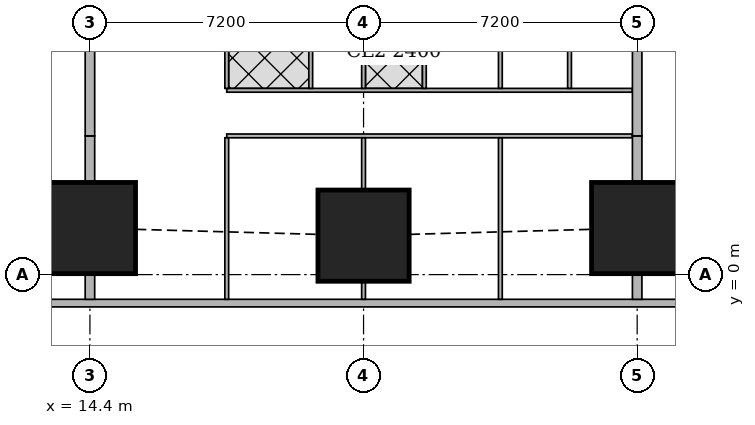
"""IFC4 building model, lengths in metres.
Left out: names, types, materials, properties, quantities, classifications, styles, units other than length and angle.
Written with IfcOpenShell. Run it as: python <this file> out.ifc"""

import sys

from ifc_helpers import new_model, si_unit, direction, frame, frame_2d, origin, origin_2d, place, context, subcontext, project, spatial, rectangle, extrude, element, fill, save


model = new_model("IFC4")
c1 = context("Model", 3, precision=1e-05, world=origin(), true_north=direction((0.0, 1.0)))
c2 = subcontext(c1, "Body", "Model", "MODEL_VIEW")
j1 = project(units=[si_unit("LENGTHUNIT", "METRE"), si_unit("PLANEANGLEUNIT", "RADIAN")], contexts=[c1])
p1 = place(None, origin())
s1 = spatial("IfcSite", under=j1, at=p1, CompositionType="ELEMENT")
p2 = place(p1, origin())
s2 = spatial("IfcBuilding", under=s1, at=p2, CompositionType="ELEMENT")
p3 = place(p2, frame((0.0, 0.0, 193.7)))
s3 = spatial("IfcBuildingStorey", under=s2, at=p3, CompositionType="ELEMENT", Elevation=193.7)
for number, where, z_axis, x_axis in (
    (1, (14.4, 1.225, 0.0), (0.0, 0.0, 1.0), (1.0, 0.0, 0.0)),
    (2, (21.6, 1.025, 0.0), (0.0, 0.0, 1.0), (1.0, 0.0, 0.0)),
    (3, (28.8, 1.225, 0.0), (0.0, 0.0, 1.0), (1.0, 0.0, 0.0)),
):
    element("IfcColumn", number, at=place(p3, frame(where, z_axis=z_axis, x_axis=x_axis)), inside=s3, PredefinedType="COLUMN", context=c2, shape_type="SweptSolid", body=[
        extrude(rectangle(XDim=2.4, YDim=2.4, at=origin_2d()), origin(), (0.0, 0.0, 1.0), 3.75),
    ])
p4 = place(p3, frame((7.363, -0.75, 0.0), z_axis=(0.0, 0.0, 1.0), x_axis=(1.0, 0.0, 0.0)))
e4 = element("IfcWall", 4, at=p4, inside=s3, PredefinedType="SOLIDWALL", context=c2, shape_type="SweptSolid", body=[
    extrude(rectangle(XDim=40.428, YDim=0.2, at=frame_2d((20.214, 0.0))), origin(), (0.0, 0.0, 1.0), 3.5),
])
p5 = place(p4, frame((2.319, 0.0, 0.9)))
e5 = element("IfcOpeningElement", 5, at=p5, cuts=e4, PredefinedType="OPENING", context=c2, shape_type="SweptSolid", body=[
    extrude(rectangle(XDim=2.4, YDim=1.5, at=frame_2d((1.2, 0.75))), frame((0.0, 0.11, 0.0), z_axis=(0.0, -1.0, 0.0), x_axis=(1.0, 0.0, 0.0)), (0.0, 0.0, 1.0), 0.22),
])
p6 = place(p4, frame((7.937, 0.0, 0.9)))
e6 = element("IfcOpeningElement", 6, at=p6, cuts=e4, PredefinedType="OPENING", context=c2, shape_type="SweptSolid", body=[
    extrude(rectangle(XDim=1.8, YDim=1.5, at=frame_2d((0.9, 0.75))), frame((0.0, 0.11, 0.0), z_axis=(0.0, -1.0, 0.0), x_axis=(1.0, 0.0, 0.0)), (0.0, 0.0, 1.0), 0.22),
])
p7 = place(p4, frame((11.537, 0.0, 0.9)))
e7 = element("IfcOpeningElement", 7, at=p7, cuts=e4, PredefinedType="OPENING", context=c2, shape_type="SweptSolid", body=[
    extrude(rectangle(XDim=1.8, YDim=1.5, at=frame_2d((0.9, 0.75))), frame((0.0, 0.11, 0.0), z_axis=(0.0, -1.0, 0.0), x_axis=(1.0, 0.0, 0.0)), (0.0, 0.0, 1.0), 0.22),
])
p8 = place(p4, frame((15.137, 0.0, 0.9)))
e8 = element("IfcOpeningElement", 8, at=p8, cuts=e4, PredefinedType="OPENING", context=c2, shape_type="SweptSolid", body=[
    extrude(rectangle(XDim=1.8, YDim=1.5, at=frame_2d((0.9, 0.75))), frame((0.0, 0.11, 0.0), z_axis=(0.0, -1.0, 0.0), x_axis=(1.0, 0.0, 0.0)), (0.0, 0.0, 1.0), 0.22),
])
p9 = place(p4, frame((18.737, 0.0, 0.9)))
e9 = element("IfcOpeningElement", 9, at=p9, cuts=e4, PredefinedType="OPENING", context=c2, shape_type="SweptSolid", body=[
    extrude(rectangle(XDim=1.8, YDim=1.5, at=frame_2d((0.9, 0.75))), frame((0.0, 0.11, 0.0), z_axis=(0.0, -1.0, 0.0), x_axis=(1.0, 0.0, 0.0)), (0.0, 0.0, 1.0), 0.22),
])
p10 = place(p4, frame((22.337, 0.0, 0.9)))
e10 = element("IfcOpeningElement", 10, at=p10, cuts=e4, PredefinedType="OPENING", context=c2, shape_type="SweptSolid", body=[
    extrude(rectangle(XDim=1.8, YDim=1.5, at=frame_2d((0.9, 0.75))), frame((0.0, 0.11, 0.0), z_axis=(0.0, -1.0, 0.0), x_axis=(1.0, 0.0, 0.0)), (0.0, 0.0, 1.0), 0.22),
])
p11 = place(p4, frame((25.937, 0.0, 0.9)))
e11 = element("IfcOpeningElement", 11, at=p11, cuts=e4, PredefinedType="OPENING", context=c2, shape_type="SweptSolid", body=[
    extrude(rectangle(XDim=1.8, YDim=1.5, at=frame_2d((0.9, 0.75))), frame((0.0, 0.11, 0.0), z_axis=(0.0, -1.0, 0.0), x_axis=(1.0, 0.0, 0.0)), (0.0, 0.0, 1.0), 0.22),
])
p12 = place(p4, frame((29.537, 0.0, 0.9)))
e12 = element("IfcOpeningElement", 12, at=p12, cuts=e4, PredefinedType="OPENING", context=c2, shape_type="SweptSolid", body=[
    extrude(rectangle(XDim=1.8, YDim=1.5, at=frame_2d((0.9, 0.75))), frame((0.0, 0.11, 0.0), z_axis=(0.0, -1.0, 0.0), x_axis=(1.0, 0.0, 0.0)), (0.0, 0.0, 1.0), 0.22),
])
p13 = place(p4, frame((33.137, 0.0, 0.9)))
e13 = element("IfcOpeningElement", 13, at=p13, cuts=e4, PredefinedType="OPENING", context=c2, shape_type="SweptSolid", body=[
    extrude(rectangle(XDim=1.8, YDim=1.5, at=frame_2d((0.9, 0.75))), frame((0.0, 0.11, 0.0), z_axis=(0.0, -1.0, 0.0), x_axis=(1.0, 0.0, 0.0)), (0.0, 0.0, 1.0), 0.22),
])
p14 = place(p3, frame((28.675, 3.65, 0.0), z_axis=(0.0, 0.0, 1.0), x_axis=(-1.0, 0.0, 0.0)))
e14 = element("IfcWall", 14, at=p14, inside=s3, PredefinedType="PARTITIONING", context=c2, shape_type="SweptSolid", body=[
    extrude(rectangle(XDim=10.675, YDim=0.1, at=frame_2d((5.337, 0.0))), origin(), (0.0, 0.0, 1.0), 3.5),
])
p15 = place(p14, frame((9.575, 0.0, 0.0)))
e15 = element("IfcOpeningElement", 15, at=p15, cuts=e14, PredefinedType="OPENING", context=c2, shape_type="SweptSolid", body=[
    extrude(rectangle(XDim=0.9, YDim=2.1, at=frame_2d((0.45, 1.05))), frame((0.0, 0.06, 0.0), z_axis=(0.0, -1.0, 0.0), x_axis=(1.0, 0.0, 0.0)), (0.0, 0.0, 1.0), 0.12),
])
p16 = place(p14, frame((5.975, 0.0, 0.0)))
e16 = element("IfcOpeningElement", 16, at=p16, cuts=e14, PredefinedType="OPENING", context=c2, shape_type="SweptSolid", body=[
    extrude(rectangle(XDim=0.9, YDim=2.1, at=frame_2d((0.45, 1.05))), frame((0.0, 0.06, 0.0), z_axis=(0.0, -1.0, 0.0), x_axis=(1.0, 0.0, 0.0)), (0.0, 0.0, 1.0), 0.12),
])
p17 = place(p14, frame((2.375, 0.0, 0.0)))
e17 = element("IfcOpeningElement", 17, at=p17, cuts=e14, PredefinedType="OPENING", context=c2, shape_type="SweptSolid", body=[
    extrude(rectangle(XDim=0.9, YDim=2.1, at=frame_2d((0.45, 1.05))), frame((0.0, 0.06, 0.0), z_axis=(0.0, -1.0, 0.0), x_axis=(1.0, 0.0, 0.0)), (0.0, 0.0, 1.0), 0.12),
])
p18 = place(p3, frame((28.675, 4.85, 0.0), z_axis=(0.0, 0.0, 1.0), x_axis=(-1.0, 0.0, 0.0)))
e18 = element("IfcWall", 18, at=p18, inside=s3, PredefinedType="PARTITIONING", context=c2, shape_type="SweptSolid", body=[
    extrude(rectangle(XDim=10.675, YDim=0.1, at=frame_2d((5.337, 0.0))), origin(), (0.0, 0.0, 1.0), 3.5),
])
p19 = place(p18, frame((9.12, 0.0, 0.0)))
e19 = element("IfcOpeningElement", 19, at=p19, cuts=e18, PredefinedType="OPENING", context=c2, shape_type="SweptSolid", body=[
    extrude(rectangle(XDim=0.9, YDim=2.1, at=frame_2d((0.45, 1.05))), frame((0.0, 0.06, 0.0), z_axis=(0.0, -1.0, 0.0), x_axis=(1.0, 0.0, 0.0)), (0.0, 0.0, 1.0), 0.12),
])
p20 = place(p18, frame((5.825, 0.0, 0.0)))
e20 = element("IfcOpeningElement", 20, at=p20, cuts=e18, PredefinedType="OPENING", context=c2, shape_type="SweptSolid", body=[
    extrude(rectangle(XDim=0.9, YDim=2.1, at=frame_2d((0.45, 1.05))), frame((0.0, 0.06, 0.0), z_axis=(0.0, -1.0, 0.0), x_axis=(1.0, 0.0, 0.0)), (0.0, 0.0, 1.0), 0.12),
])
p21 = place(p18, frame((2.115, 0.0, 0.0)))
e21 = element("IfcOpeningElement", 21, at=p21, cuts=e18, PredefinedType="OPENING", context=c2, shape_type="SweptSolid", body=[
    extrude(rectangle(XDim=0.9, YDim=2.1, at=frame_2d((0.45, 1.05))), frame((0.0, 0.06, 0.0), z_axis=(0.0, -1.0, 0.0), x_axis=(1.0, 0.0, 0.0)), (0.0, 0.0, 1.0), 0.12),
])
p22 = place(p18, frame((7.32, 0.0, 0.0)))
e22 = element("IfcOpeningElement", 22, at=p22, cuts=e18, PredefinedType="OPENING", context=c2, shape_type="SweptSolid", body=[
    extrude(rectangle(XDim=0.9, YDim=2.1, at=frame_2d((0.45, 1.05))), frame((0.0, 0.06, 0.0), z_axis=(0.0, -1.0, 0.0), x_axis=(1.0, 0.0, 0.0)), (0.0, 0.0, 1.0), 0.12),
])
p23 = place(p18, frame((4.025, 0.0, 0.0)))
e23 = element("IfcOpeningElement", 23, at=p23, cuts=e18, PredefinedType="OPENING", context=c2, shape_type="SweptSolid", body=[
    extrude(rectangle(XDim=0.9, YDim=2.1, at=frame_2d((0.45, 1.05))), frame((0.0, 0.06, 0.0), z_axis=(0.0, -1.0, 0.0), x_axis=(1.0, 0.0, 0.0)), (0.0, 0.0, 1.0), 0.12),
])
p24 = place(p18, frame((0.315, 0.0, 0.0)))
e24 = element("IfcOpeningElement", 24, at=p24, cuts=e18, PredefinedType="OPENING", context=c2, shape_type="SweptSolid", body=[
    extrude(rectangle(XDim=0.9, YDim=2.1, at=frame_2d((0.45, 1.05))), frame((0.0, 0.06, 0.0), z_axis=(0.0, -1.0, 0.0), x_axis=(1.0, 0.0, 0.0)), (0.0, 0.0, 1.0), 0.12),
])
p25 = place(p3, frame((18.0, -0.65, 0.0), z_axis=(0.0, 0.0, 1.0), x_axis=(0.0, 1.0, 0.0)))
e25 = element("IfcWall", 25, at=p25, inside=s3, PredefinedType="PARTITIONING", context=c2, shape_type="SweptSolid", body=[
    extrude(rectangle(XDim=4.25, YDim=0.1, at=frame_2d((2.125, 0.0))), origin(), (0.0, 0.0, 1.0), 2.05),
])
p26 = place(p3, frame((21.6, -0.65, 0.0), z_axis=(0.0, 0.0, 1.0), x_axis=(0.0, 1.0, 0.0)))
e26 = element("IfcWall", 26, at=p26, inside=s3, PredefinedType="PARTITIONING", context=c2, shape_type="SweptSolid", body=[
    extrude(rectangle(XDim=0.474, YDim=0.1, at=frame_2d((0.237, 0.0))), origin(), (0.0, 0.0, 1.0), 3.5),
])
p27 = place(p3, frame((21.6, 2.226, 0.0), z_axis=(0.0, 0.0, 1.0), x_axis=(0.0, 1.0, 0.0)))
e27 = element("IfcWall", 27, at=p27, inside=s3, PredefinedType="PARTITIONING", context=c2, shape_type="SweptSolid", body=[
    extrude(rectangle(XDim=1.374, YDim=0.1, at=frame_2d((0.687, 0.0))), origin(), (0.0, 0.0, 1.0), 3.5),
])
p28 = place(p3, frame((25.2, -0.65, 0.0), z_axis=(0.0, 0.0, 1.0), x_axis=(0.0, 1.0, 0.0)))
e28 = element("IfcWall", 28, at=p28, inside=s3, PredefinedType="PARTITIONING", context=c2, shape_type="SweptSolid", body=[
    extrude(rectangle(XDim=4.25, YDim=0.1, at=frame_2d((2.125, 0.0))), origin(), (0.0, 0.0, 1.0), 2.05),
])
p29 = place(p3, frame((18.0, 4.9, 0.0), z_axis=(0.0, 0.0, 1.0), x_axis=(0.0, 1.0, 0.0)))
e29 = element("IfcWall", 29, at=p29, inside=s3, PredefinedType="PARTITIONING", context=c2, shape_type="SweptSolid", body=[
    extrude(rectangle(XDim=3.275, YDim=0.1, at=frame_2d((1.638, 0.0))), origin(), (0.0, 0.0, 1.0), 3.5),
])
p30 = place(p3, frame((21.6, 4.9, 0.0), z_axis=(0.0, 0.0, 1.0), x_axis=(0.0, 1.0, 0.0)))
e30 = element("IfcWall", 30, at=p30, inside=s3, PredefinedType="PARTITIONING", context=c2, shape_type="SweptSolid", body=[
    extrude(rectangle(XDim=1.899, YDim=0.1, at=frame_2d((0.95, 0.0))), origin(), (0.0, 0.0, 1.0), 3.5),
])
for number, where, z_axis, x_axis in (
    (31, (25.2, 4.9, 0.0), (0.0, 0.0, 1.0), (0.0, 1.0, 0.0)),
    (32, (20.21, 4.9, 0.0), (0.0, 0.0, 1.0), (0.0, 1.0, 0.0)),
    (33, (23.2, 4.9, 0.0), (0.0, 0.0, 1.0), (0.0, 1.0, 0.0)),
    (34, (27.02, 4.9, 0.0), (0.0, 0.0, 1.0), (0.0, 1.0, 0.0)),
):
    element("IfcWall", number, at=place(p3, frame(where, z_axis=z_axis, x_axis=x_axis)), inside=s3, PredefinedType="PARTITIONING", context=c2, shape_type="SweptSolid", body=[
        extrude(rectangle(XDim=3.275, YDim=0.1, at=frame_2d((1.638, 0.0))), origin(), (0.0, 0.0, 1.0), 3.5),
    ])
p31 = place(p3, frame((14.4, -0.65, 0.0), z_axis=(0.0, 0.0, 1.0), x_axis=(0.0, 1.0, 0.0)))
e35 = element("IfcWall", 35, at=p31, inside=s3, PredefinedType="SOLIDWALL", context=c2, shape_type="SweptSolid", body=[
    extrude(rectangle(XDim=0.674, YDim=0.25, at=frame_2d((0.337, 0.0))), origin(), (0.0, 0.0, 1.0), 2.05),
])
p32 = place(p3, frame((14.4, 2.426, 0.0), z_axis=(0.0, 0.0, 1.0), x_axis=(0.0, 1.0, 0.0)))
e36 = element("IfcWall", 36, at=p32, inside=s3, PredefinedType="SOLIDWALL", context=c2, shape_type="SweptSolid", body=[
    extrude(rectangle(XDim=1.224, YDim=0.25, at=frame_2d((0.612, 0.0))), origin(), (0.0, 0.0, 1.0), 2.05),
])
p33 = place(p3, frame((14.4, 3.65, 0.0), z_axis=(0.0, 0.0, 1.0), x_axis=(0.0, 1.0, 0.0)))
e37 = element("IfcWall", 37, at=p33, inside=s3, PredefinedType="SOLIDWALL", context=c2, shape_type="SweptSolid", body=[
    extrude(rectangle(XDim=3.149, YDim=0.25, at=frame_2d((1.575, 0.0))), origin(), (0.0, 0.0, 1.0), 3.5),
])
p34 = place(p3, frame((28.8, -0.65, 0.0), z_axis=(0.0, 0.0, 1.0), x_axis=(0.0, 1.0, 0.0)))
e38 = element("IfcWall", 38, at=p34, inside=s3, PredefinedType="SOLIDWALL", context=c2, shape_type="SweptSolid", body=[
    extrude(rectangle(XDim=0.674, YDim=0.25, at=frame_2d((0.337, 0.0))), origin(), (0.0, 0.0, 1.0), 2.05),
])
p35 = place(p3, frame((28.8, 2.426, 0.0), z_axis=(0.0, 0.0, 1.0), x_axis=(0.0, 1.0, 0.0)))
e39 = element("IfcWall", 39, at=p35, inside=s3, PredefinedType="SOLIDWALL", context=c2, shape_type="SweptSolid", body=[
    extrude(rectangle(XDim=1.224, YDim=0.25, at=frame_2d((0.612, 0.0))), origin(), (0.0, 0.0, 1.0), 2.05),
])
p36 = place(p3, frame((28.8, 3.65, 0.0), z_axis=(0.0, 0.0, 1.0), x_axis=(0.0, 1.0, 0.0)))
e40 = element("IfcWall", 40, at=p36, inside=s3, PredefinedType="SOLIDWALL", context=c2, shape_type="SweptSolid", body=[
    extrude(rectangle(XDim=3.149, YDim=0.25, at=frame_2d((1.575, 0.0))), origin(), (0.0, 0.0, 1.0), 3.5),
])
p37 = place(p6, origin())
e41 = element("IfcWindow", 41, at=p37, inside=s3, PartitioningType="SINGLE_PANEL", PredefinedType="WINDOW", context=c2, shape_type="SweptSolid", body=[
    extrude(rectangle(XDim=1.8, YDim=1.5, at=frame_2d((0.9, 0.75))), frame((0.0, 0.03, 0.0), z_axis=(0.0, -1.0, 0.0), x_axis=(1.0, 0.0, 0.0)), (0.0, 0.0, 1.0), 0.06),
])
fill(e6, e41)
p38 = place(p7, origin())
e42 = element("IfcWindow", 42, at=p38, inside=s3, PartitioningType="SINGLE_PANEL", PredefinedType="WINDOW", context=c2, shape_type="SweptSolid", body=[
    extrude(rectangle(XDim=1.8, YDim=1.5, at=frame_2d((0.9, 0.75))), frame((0.0, 0.03, 0.0), z_axis=(0.0, -1.0, 0.0), x_axis=(1.0, 0.0, 0.0)), (0.0, 0.0, 1.0), 0.06),
])
fill(e7, e42)
p39 = place(p8, origin())
e43 = element("IfcWindow", 43, at=p39, inside=s3, PartitioningType="SINGLE_PANEL", PredefinedType="WINDOW", context=c2, shape_type="SweptSolid", body=[
    extrude(rectangle(XDim=1.8, YDim=1.5, at=frame_2d((0.9, 0.75))), frame((0.0, 0.03, 0.0), z_axis=(0.0, -1.0, 0.0), x_axis=(1.0, 0.0, 0.0)), (0.0, 0.0, 1.0), 0.06),
])
fill(e8, e43)
p40 = place(p9, origin())
e44 = element("IfcWindow", 44, at=p40, inside=s3, PartitioningType="SINGLE_PANEL", PredefinedType="WINDOW", context=c2, shape_type="SweptSolid", body=[
    extrude(rectangle(XDim=1.8, YDim=1.5, at=frame_2d((0.9, 0.75))), frame((0.0, 0.03, 0.0), z_axis=(0.0, -1.0, 0.0), x_axis=(1.0, 0.0, 0.0)), (0.0, 0.0, 1.0), 0.06),
])
fill(e9, e44)
p41 = place(p10, origin())
e45 = element("IfcWindow", 45, at=p41, inside=s3, PartitioningType="SINGLE_PANEL", PredefinedType="WINDOW", context=c2, shape_type="SweptSolid", body=[
    extrude(rectangle(XDim=1.8, YDim=1.5, at=frame_2d((0.9, 0.75))), frame((0.0, 0.03, 0.0), z_axis=(0.0, -1.0, 0.0), x_axis=(1.0, 0.0, 0.0)), (0.0, 0.0, 1.0), 0.06),
])
fill(e10, e45)
p42 = place(p15, origin())
e46 = element("IfcDoor", 46, at=p42, inside=s3, OperationType="SINGLE_SWING_RIGHT", PredefinedType="DOOR", context=c2, shape_type="SweptSolid", body=[
    extrude(rectangle(XDim=0.9, YDim=2.1, at=frame_2d((0.45, 1.05))), frame((0.0, 0.025, 0.0), z_axis=(0.0, -1.0, 0.0), x_axis=(1.0, 0.0, 0.0)), (0.0, 0.0, 1.0), 0.05),
])
fill(e15, e46)
p43 = place(p16, origin())
e47 = element("IfcDoor", 47, at=p43, inside=s3, OperationType="SINGLE_SWING_RIGHT", PredefinedType="DOOR", context=c2, shape_type="SweptSolid", body=[
    extrude(rectangle(XDim=0.9, YDim=2.1, at=frame_2d((0.45, 1.05))), frame((0.0, 0.025, 0.0), z_axis=(0.0, -1.0, 0.0), x_axis=(1.0, 0.0, 0.0)), (0.0, 0.0, 1.0), 0.05),
])
fill(e16, e47)
p44 = place(p17, origin())
e48 = element("IfcDoor", 48, at=p44, inside=s3, OperationType="SINGLE_SWING_RIGHT", PredefinedType="DOOR", context=c2, shape_type="SweptSolid", body=[
    extrude(rectangle(XDim=0.9, YDim=2.1, at=frame_2d((0.45, 1.05))), frame((0.0, 0.025, 0.0), z_axis=(0.0, -1.0, 0.0), x_axis=(1.0, 0.0, 0.0)), (0.0, 0.0, 1.0), 0.05),
])
fill(e17, e48)
p45 = place(p19, origin())
e49 = element("IfcDoor", 49, at=p45, inside=s3, OperationType="SINGLE_SWING_LEFT", PredefinedType="DOOR", context=c2, shape_type="SweptSolid", body=[
    extrude(rectangle(XDim=0.9, YDim=2.1, at=frame_2d((0.45, 1.05))), frame((0.0, 0.025, 0.0), z_axis=(0.0, -1.0, 0.0), x_axis=(1.0, 0.0, 0.0)), (0.0, 0.0, 1.0), 0.05),
])
fill(e19, e49)
p46 = place(p20, origin())
e50 = element("IfcDoor", 50, at=p46, inside=s3, OperationType="SINGLE_SWING_RIGHT", PredefinedType="DOOR", context=c2, shape_type="SweptSolid", body=[
    extrude(rectangle(XDim=0.9, YDim=2.1, at=frame_2d((0.45, 1.05))), frame((0.0, 0.025, 0.0), z_axis=(0.0, -1.0, 0.0), x_axis=(1.0, 0.0, 0.0)), (0.0, 0.0, 1.0), 0.05),
])
fill(e20, e50)
p47 = place(p21, origin())
e51 = element("IfcDoor", 51, at=p47, inside=s3, OperationType="SINGLE_SWING_RIGHT", PredefinedType="DOOR", context=c2, shape_type="SweptSolid", body=[
    extrude(rectangle(XDim=0.9, YDim=2.1, at=frame_2d((0.45, 1.05))), frame((0.0, 0.025, 0.0), z_axis=(0.0, -1.0, 0.0), x_axis=(1.0, 0.0, 0.0)), (0.0, 0.0, 1.0), 0.05),
])
fill(e21, e51)
p48 = place(p22, origin())
e52 = element("IfcDoor", 52, at=p48, inside=s3, OperationType="SINGLE_SWING_LEFT", PredefinedType="DOOR", context=c2, shape_type="SweptSolid", body=[
    extrude(rectangle(XDim=0.9, YDim=2.1, at=frame_2d((0.45, 1.05))), frame((0.0, 0.025, 0.0), z_axis=(0.0, -1.0, 0.0), x_axis=(1.0, 0.0, 0.0)), (0.0, 0.0, 1.0), 0.05),
])
fill(e22, e52)
p49 = place(p23, origin())
e53 = element("IfcDoor", 53, at=p49, inside=s3, OperationType="SINGLE_SWING_LEFT", PredefinedType="DOOR", context=c2, shape_type="SweptSolid", body=[
    extrude(rectangle(XDim=0.9, YDim=2.1, at=frame_2d((0.45, 1.05))), frame((0.0, 0.025, 0.0), z_axis=(0.0, -1.0, 0.0), x_axis=(1.0, 0.0, 0.0)), (0.0, 0.0, 1.0), 0.05),
])
fill(e23, e53)
p50 = place(p24, origin())
e54 = element("IfcDoor", 54, at=p50, inside=s3, OperationType="SINGLE_SWING_RIGHT", PredefinedType="DOOR", context=c2, shape_type="SweptSolid", body=[
    extrude(rectangle(XDim=0.9, YDim=2.1, at=frame_2d((0.45, 1.05))), frame((0.0, 0.025, 0.0), z_axis=(0.0, -1.0, 0.0), x_axis=(1.0, 0.0, 0.0)), (0.0, 0.0, 1.0), 0.05),
])
fill(e24, e54)
save(model, sys.argv[1])
